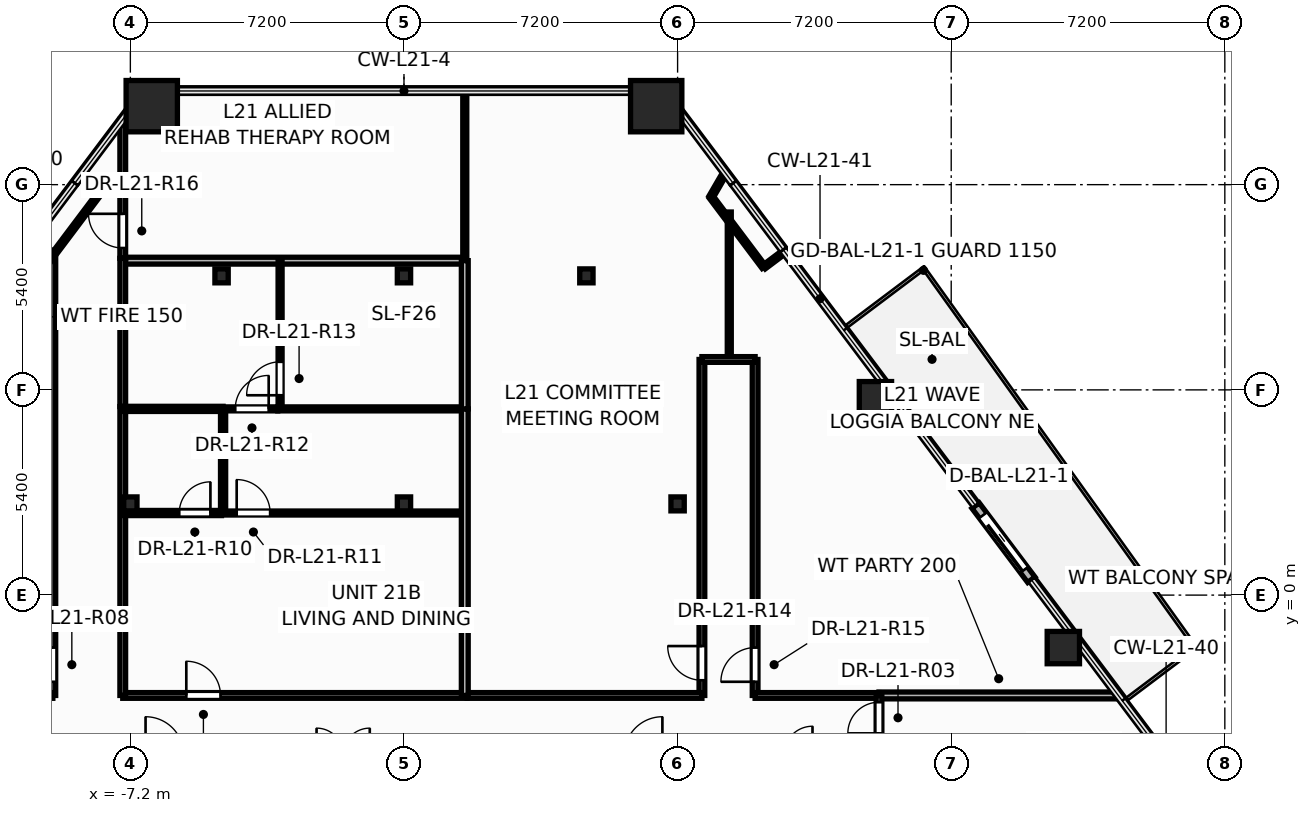
"""IFC4 building model, lengths in metres.
Left out: names, types, materials, properties, quantities, classifications, styles, units other than length and angle.
Written with IfcOpenShell. Run it as: python <this file> out.ifc"""

import sys

from ifc_helpers import new_model, si_unit, direction, frame, frame_2d, origin, origin_2d, place, context, subcontext, project, spatial, rectangle, hollow_rectangle, hollow_circle, i_section, extrude, element, fill, save


model = new_model("IFC4")
c1 = context("Model", 3, precision=1e-05, world=origin(), true_north=direction((0.0, 1.0)))
c2 = subcontext(c1, "Body", "Model", "MODEL_VIEW")
j1 = project(units=[si_unit("LENGTHUNIT", "METRE"), si_unit("PLANEANGLEUNIT", "RADIAN")], contexts=[c1])
p1 = place(None, origin())
s1 = spatial("IfcSite", under=j1, at=p1, CompositionType="ELEMENT")
p2 = place(p1, origin())
s2 = spatial("IfcBuilding", under=s1, at=p2, CompositionType="ELEMENT")
p3 = place(p2, frame((0.0, 0.0, 82.8)))
s3 = spatial("IfcBuildingStorey", under=s2, at=p3, CompositionType="ELEMENT", Elevation=82.8)
for number, where, z_axis, x_axis in (
    (1, (6.637, 12.865, 0.0), (0.0, 0.0, 1.0), (1.0, 0.0, 0.0)),
    (2, (-6.637, 12.865, 0.0), (0.0, 0.0, 1.0), (1.0, 0.0, 0.0)),
):
    element("IfcColumn", number, at=place(p3, frame(where, z_axis=z_axis, x_axis=x_axis)), inside=s3, PredefinedType="COLUMN", context=c2, shape_type="SweptSolid", body=[
        extrude(hollow_rectangle(XDim=1.35, YDim=1.35, WallThickness=0.065, at=origin_2d()), origin(), (0.0, 0.0, 1.0), 3.6),
    ])
for number, where, z_axis, x_axis in (
    (3, (17.351, -1.381, 0.0), (0.0, 0.0, 1.0), (1.0, 0.0, 0.0)),
    (4, (12.406, 5.194, 0.0), (0.0, 0.0, 1.0), (1.0, 0.0, 0.0)),
):
    element("IfcColumn", number, at=place(p3, frame(where, z_axis=z_axis, x_axis=x_axis)), inside=s3, PredefinedType="COLUMN", context=c2, shape_type="SweptSolid", body=[
        extrude(hollow_circle(Radius=0.425, WallThickness=0.038, at=origin_2d()), origin(), (0.0, 0.0, 1.0), 3.6),
    ])
for number, where, z_axis, x_axis in (
    (5, (-7.2, 2.4, 0.0), (0.0, 0.0, 1.0), (1.0, 0.0, 0.0)),
    (6, (0.0, 2.4, 0.0), (0.0, 0.0, 1.0), (1.0, 0.0, 0.0)),
    (7, (7.2, 2.4, 0.0), (0.0, 0.0, 1.0), (1.0, 0.0, 0.0)),
    (8, (-4.8, 8.4, 0.0), (0.0, 0.0, 1.0), (1.0, 0.0, 0.0)),
    (9, (0.0, 8.4, 0.0), (0.0, 0.0, 1.0), (1.0, 0.0, 0.0)),
    (10, (4.8, 8.4, 0.0), (0.0, 0.0, 1.0), (1.0, 0.0, 0.0)),
):
    element("IfcColumn", number, at=place(p3, frame(where, z_axis=z_axis, x_axis=x_axis)), inside=s3, PredefinedType="COLUMN", context=c2, shape_type="SweptSolid", body=[
        extrude(i_section(OverallWidth=0.35, OverallDepth=0.367, WebThickness=0.025, FlangeThickness=0.032, at=origin_2d()), origin(), (0.0, 0.0, 1.0), 3.6),
    ])
p4 = place(p3, frame((16.508, 0.405, -0.015), z_axis=(0.0, 0.0, 1.0), x_axis=(-0.601008208177, 0.799242850268, 0.0)))
e11 = element("IfcWall", 11, at=p4, inside=s3, PredefinedType="STANDARD", context=c2, shape_type="SweptSolid", body=[
    extrude(rectangle(XDim=2.44, YDim=0.24, at=frame_2d((1.22, 0.0))), origin(), (0.0, 0.0, 1.0), 2.729),
])
p5 = place(p4, frame((0.32, 0.0, 0.015)))
e12 = element("IfcOpeningElement", 12, at=p5, cuts=e11, PredefinedType="OPENING", context=c2, shape_type="SweptSolid", body=[
    extrude(rectangle(XDim=1.806, YDim=2.204, at=frame_2d((0.9, 1.102))), frame((0.0, 0.13, 0.0), z_axis=(0.0, -1.0, 0.0), x_axis=(1.0, 0.0, 0.0)), (0.0, 0.0, 1.0), 0.26),
])
p6 = place(p3, frame((-9.24, -2.64, 0.0), z_axis=(0.0, 0.0, 1.0), x_axis=(0.0, 1.0, 0.0)))
e13 = element("IfcWall", 13, at=p6, inside=s3, PredefinedType="PARTITIONING", context=c2, shape_type="SweptSolid", body=[
    extrude(rectangle(XDim=11.72, YDim=0.15, at=frame_2d((5.86, 0.0))), origin(), (0.0, 0.0, 1.0), 2.509),
])
p7 = place(p6, frame((0.359, 0.0, 0.0)))
e14 = element("IfcOpeningElement", 14, at=p7, cuts=e13, PredefinedType="OPENING", context=c2, shape_type="SweptSolid", body=[
    extrude(rectangle(XDim=0.906, YDim=2.104, at=frame_2d((0.45, 1.052))), frame((0.0, 0.085, 0.0), z_axis=(0.0, -1.0, 0.0), x_axis=(1.0, 0.0, 0.0)), (0.0, 0.0, 1.0), 0.17),
])
p8 = place(p3, frame((-7.4, -2.64, 0.0), z_axis=(0.0, 0.0, 1.0), x_axis=(1.0, 0.0, 0.0)))
e15 = element("IfcWall", 15, at=p8, inside=s3, PredefinedType="PARTITIONING", context=c2, shape_type="SweptSolid", body=[
    extrude(rectangle(XDim=9.06, YDim=0.15, at=frame_2d((4.53, 0.0))), origin(), (0.0, 0.0, 1.0), 2.325),
])
p9 = place(p8, frame((1.672, 0.0, 0.0)))
e16 = element("IfcOpeningElement", 16, at=p9, cuts=e15, PredefinedType="OPENING", context=c2, shape_type="SweptSolid", body=[
    extrude(rectangle(XDim=0.906, YDim=2.104, at=frame_2d((0.45, 1.052))), frame((0.0, 0.085, 0.0), z_axis=(0.0, -1.0, 0.0), x_axis=(1.0, 0.0, 0.0)), (0.0, 0.0, 1.0), 0.17),
])
p10 = place(p3, frame((7.84, -2.64, 0.0), z_axis=(0.0, 0.0, 1.0), x_axis=(0.0, 1.0, 0.0)))
e17 = element("IfcWall", 17, at=p10, inside=s3, PredefinedType="PARTITIONING", context=c2, shape_type="SweptSolid", body=[
    extrude(rectangle(XDim=8.84, YDim=0.15, at=frame_2d((4.42, 0.0))), origin(), (0.0, 0.0, 1.0), 2.509),
])
p11 = place(p10, frame((0.399, 0.0, 0.0)))
e18 = element("IfcOpeningElement", 18, at=p11, cuts=e17, PredefinedType="OPENING", context=c2, shape_type="SweptSolid", body=[
    extrude(rectangle(XDim=0.906, YDim=2.104, at=frame_2d((0.45, 1.052))), frame((0.0, 0.085, 0.0), z_axis=(0.0, -1.0, 0.0), x_axis=(1.0, 0.0, 0.0)), (0.0, 0.0, 1.0), 0.17),
])
p12 = place(p3, frame((9.24, -2.64, 0.0), z_axis=(0.0, 0.0, 1.0), x_axis=(0.0, 1.0, 0.0)))
e19 = element("IfcWall", 19, at=p12, inside=s3, PredefinedType="PARTITIONING", context=c2, shape_type="SweptSolid", body=[
    extrude(rectangle(XDim=8.84, YDim=0.15, at=frame_2d((4.42, 0.0))), origin(), (0.0, 0.0, 1.0), 2.509),
])
p13 = place(p12, frame((0.359, 0.0, 0.0)))
e20 = element("IfcOpeningElement", 20, at=p13, cuts=e19, PredefinedType="OPENING", context=c2, shape_type="SweptSolid", body=[
    extrude(rectangle(XDim=0.906, YDim=2.104, at=frame_2d((0.45, 1.052))), frame((0.0, 0.085, 0.0), z_axis=(0.0, -1.0, 0.0), x_axis=(1.0, 0.0, 0.0)), (0.0, 0.0, 1.0), 0.17),
])
p14 = place(p3, frame((-4.8, 2.16, 0.0), z_axis=(0.0, 0.0, 1.0), x_axis=(1.0, 0.0, 0.0)))
e21 = element("IfcWall", 21, at=p14, inside=s3, PredefinedType="PARTITIONING", context=c2, shape_type="SweptSolid", body=[
    extrude(rectangle(XDim=6.4, YDim=0.105, at=frame_2d((3.2, 0.0))), origin(), (0.0, 0.0, 1.0), 2.325),
])
p15 = place(p14, frame((0.398, 0.0, 0.0)))
e22 = element("IfcOpeningElement", 22, at=p15, cuts=e21, PredefinedType="OPENING", context=c2, shape_type="SweptSolid", body=[
    extrude(rectangle(XDim=0.886, YDim=2.104, at=frame_2d((0.44, 1.052))), frame((0.0, 0.062, 0.0), z_axis=(0.0, -1.0, 0.0), x_axis=(1.0, 0.0, 0.0)), (0.0, 0.0, 1.0), 0.125),
])
p16 = place(p3, frame((1.662, -2.64, 0.0), z_axis=(0.0, 0.0, 1.0), x_axis=(1.0, 0.0, 0.0)))
e23 = element("IfcWall", 23, at=p16, inside=s3, PredefinedType="PARTITIONING", context=c2, shape_type="SweptSolid", body=[
    extrude(rectangle(XDim=6.178, YDim=0.15, at=frame_2d((3.089, 0.0))), origin(), (0.0, 0.0, 1.0), 2.325),
])
p17 = place(p3, frame((12.5, -2.64, 0.0), z_axis=(0.0, 0.0, 1.0), x_axis=(1.0, 0.0, 0.0)))
e24 = element("IfcWall", 24, at=p17, inside=s3, PredefinedType="PARTITIONING", context=c2, shape_type="SweptSolid", body=[
    extrude(rectangle(XDim=6.298, YDim=0.18, at=frame_2d((3.149, 0.0))), origin(), (0.0, 0.0, 1.0), 2.713),
])
p18 = place(p3, frame((-14.64, -2.64, 0.0), z_axis=(0.0, 0.0, 1.0), x_axis=(1.0, 0.0, 0.0)))
e25 = element("IfcWall", 25, at=p18, inside=s3, PredefinedType="PARTITIONING", context=c2, shape_type="SweptSolid", body=[
    extrude(rectangle(XDim=5.4, YDim=0.15, at=frame_2d((2.7, 0.0))), origin(), (0.0, 0.0, 1.0), 3.35),
])
p19 = place(p3, frame((-3.32, 4.9, 0.0), z_axis=(0.0, 0.0, 1.0), x_axis=(1.0, 0.0, 0.0)))
e26 = element("IfcWall", 26, at=p19, inside=s3, PredefinedType="PARTITIONING", context=c2, shape_type="SweptSolid", body=[
    extrude(rectangle(XDim=4.92, YDim=0.105, at=frame_2d((2.46, 0.0))), origin(), (0.0, 0.0, 1.0), 2.325),
])
p20 = place(p3, frame((-7.4, 8.8, 0.0), z_axis=(0.0, 0.0, 1.0), x_axis=(1.0, 0.0, 0.0)))
e27 = element("IfcWall", 27, at=p20, inside=s3, PredefinedType="PARTITIONING", context=c2, shape_type="SweptSolid", body=[
    extrude(rectangle(XDim=9.0, YDim=0.18, at=frame_2d((4.5, 0.0))), origin(), (0.0, 0.0, 1.0), 2.509),
])
p21 = place(p3, frame((-7.4, -2.64, 0.0), z_axis=(0.0, 0.0, 1.0), x_axis=(0.0, 1.0, 0.0)))
e28 = element("IfcWall", 28, at=p21, inside=s3, PredefinedType="PARTITIONING", context=c2, shape_type="SweptSolid", body=[
    extrude(rectangle(XDim=7.6, YDim=0.15, at=frame_2d((3.8, 0.0))), origin(), (0.0, 0.0, 1.0), 2.325),
])
p22 = place(p3, frame((1.6, -2.64, 0.0), z_axis=(0.0, 0.0, 1.0), x_axis=(0.0, 1.0, 0.0)))
e29 = element("IfcWall", 29, at=p22, inside=s3, PredefinedType="PARTITIONING", context=c2, shape_type="SweptSolid", body=[
    extrude(rectangle(XDim=7.54, YDim=0.18, at=frame_2d((3.77, 0.0))), origin(), (0.0, 0.0, 1.0), 2.325),
])
p23 = place(p3, frame((1.6, 8.74, 0.0), z_axis=(0.0, 0.0, 1.0), x_axis=(0.0, 1.0, 0.0)))
e30 = element("IfcWall", 30, at=p23, inside=s3, PredefinedType="PARTITIONING", context=c2, shape_type="SweptSolid", body=[
    extrude(rectangle(XDim=4.525, YDim=0.105, at=frame_2d((2.263, 0.0))), origin(), (0.0, 0.0, 1.0), 2.713),
])
p24 = place(p3, frame((-7.4, 4.962, 0.0), z_axis=(0.0, 0.0, 1.0), x_axis=(0.0, 1.0, 0.0)))
e31 = element("IfcWall", 31, at=p24, inside=s3, PredefinedType="PARTITIONING", context=c2, shape_type="SweptSolid", body=[
    extrude(rectangle(XDim=3.898, YDim=0.15, at=frame_2d((1.949, 0.0))), origin(), (0.0, 0.0, 1.0), 2.509),
])
p25 = place(p3, frame((-3.26, 4.9, 0.0), z_axis=(0.0, 0.0, 1.0), x_axis=(0.0, 1.0, 0.0)))
e32 = element("IfcWall", 32, at=p25, inside=s3, PredefinedType="PARTITIONING", context=c2, shape_type="SweptSolid", body=[
    extrude(rectangle(XDim=3.9, YDim=0.105, at=frame_2d((1.95, 0.0))), origin(), (0.0, 0.0, 1.0), 2.509),
])
p26 = place(p25, frame((0.358, 0.0, 0.0)))
e33 = element("IfcOpeningElement", 33, at=p26, cuts=e32, PredefinedType="OPENING", context=c2, shape_type="SweptSolid", body=[
    extrude(rectangle(XDim=0.886, YDim=2.104, at=frame_2d((0.44, 1.052))), frame((0.0, 0.062, 0.0), z_axis=(0.0, -1.0, 0.0), x_axis=(1.0, 0.0, 0.0)), (0.0, 0.0, 1.0), 0.125),
])
p27 = place(p3, frame((1.6, 4.9, 0.0), z_axis=(0.0, 0.0, 1.0), x_axis=(0.0, 1.0, 0.0)))
e34 = element("IfcWall", 34, at=p27, inside=s3, PredefinedType="PARTITIONING", context=c2, shape_type="SweptSolid", body=[
    extrude(rectangle(XDim=3.9, YDim=0.18, at=frame_2d((1.95, 0.0))), origin(), (0.0, 0.0, 1.0), 2.509),
])
p28 = place(p3, frame((8.56, 6.2, 0.0), z_axis=(0.0, 0.0, 1.0), x_axis=(0.0, 1.0, 0.0)))
e35 = element("IfcWall", 35, at=p28, inside=s3, PredefinedType="PARTITIONING", context=c2, shape_type="SweptSolid", body=[
    extrude(rectangle(XDim=3.88, YDim=0.105, at=frame_2d((1.94, 0.0))), origin(), (0.0, 0.0, 1.0), 2.509),
])
p29 = place(p3, frame((-7.4, 8.862, 0.0), z_axis=(0.0, 0.0, 1.0), x_axis=(0.0, 1.0, 0.0)))
e36 = element("IfcWall", 36, at=p29, inside=s3, PredefinedType="PARTITIONING", context=c2, shape_type="SweptSolid", body=[
    extrude(rectangle(XDim=3.654, YDim=0.15, at=frame_2d((1.827, 0.0))), origin(), (0.0, 0.0, 1.0), 2.713),
])
p30 = place(p29, frame((0.271, 0.0, 0.0)))
e37 = element("IfcOpeningElement", 37, at=p30, cuts=e36, PredefinedType="OPENING", context=c2, shape_type="SweptSolid", body=[
    extrude(rectangle(XDim=0.906, YDim=2.104, at=frame_2d((0.45, 1.052))), frame((0.0, 0.085, 0.0), z_axis=(0.0, -1.0, 0.0), x_axis=(1.0, 0.0, 0.0)), (0.0, 0.0, 1.0), 0.17),
])
p31 = place(p3, frame((9.24, -2.64, 0.0), z_axis=(0.0, 0.0, 1.0), x_axis=(1.0, 0.0, 0.0)))
e38 = element("IfcWall", 38, at=p31, inside=s3, PredefinedType="PARTITIONING", context=c2, shape_type="SweptSolid", body=[
    extrude(rectangle(XDim=3.26, YDim=0.15, at=frame_2d((1.63, 0.0))), origin(), (0.0, 0.0, 1.0), 3.35),
])
p32 = place(p3, frame((-4.76, 2.16, 0.0), z_axis=(0.0, 0.0, 1.0), x_axis=(0.0, 1.0, 0.0)))
e39 = element("IfcWall", 39, at=p32, inside=s3, PredefinedType="PARTITIONING", context=c2, shape_type="SweptSolid", body=[
    extrude(rectangle(XDim=2.74, YDim=0.135, at=frame_2d((1.37, 0.0))), origin(), (0.0, 0.0, 1.0), 2.325),
])
p33 = place(p3, frame((-7.4, 2.16, 0.0), z_axis=(0.0, 0.0, 1.0), x_axis=(1.0, 0.0, 0.0)))
e40 = element("IfcWall", 40, at=p33, inside=s3, PredefinedType="PARTITIONING", context=c2, shape_type="SweptSolid", body=[
    extrude(rectangle(XDim=2.598, YDim=0.135, at=frame_2d((1.299, 0.0))), origin(), (0.0, 0.0, 1.0), 2.325),
])
p34 = place(p33, frame((1.487, 0.0, 0.0)))
e41 = element("IfcOpeningElement", 41, at=p34, cuts=e40, PredefinedType="OPENING", context=c2, shape_type="SweptSolid", body=[
    extrude(rectangle(XDim=0.826, YDim=2.104, at=frame_2d((0.41, 1.052))), frame((0.0, 0.078, 0.0), z_axis=(0.0, -1.0, 0.0), x_axis=(1.0, 0.0, 0.0)), (0.0, 0.0, 1.0), 0.155),
])
p35 = place(p3, frame((-7.4, 4.9, 0.0), z_axis=(0.0, 0.0, 1.0), x_axis=(1.0, 0.0, 0.0)))
e42 = element("IfcWall", 42, at=p35, inside=s3, PredefinedType="PARTITIONING", context=c2, shape_type="SweptSolid", body=[
    extrude(rectangle(XDim=2.64, YDim=0.135, at=frame_2d((1.32, 0.0))), origin(), (0.0, 0.0, 1.0), 2.509),
])
for number, where, z_axis, x_axis in (
    (43, (-8.082, 10.478, 0.0), (0.0, 0.0, 1.0), (-0.601, -0.799, 0.0)),
    (44, (9.471, 8.631, 0.0), (0.0, 0.0, 1.0), (-0.601, 0.799, 0.0)),
):
    element("IfcWall", number, at=place(p3, frame(where, z_axis=z_axis, x_axis=x_axis)), inside=s3, PredefinedType="PARTITIONING", context=c2, shape_type="SweptSolid", body=[
        extrude(rectangle(XDim=2.311, YDim=0.12, at=frame_2d((1.156, 0.0))), origin(), (0.0, 0.0, 1.0), 3.35),
    ])
p36 = place(p3, frame((12.5, -4.24, 0.0), z_axis=(0.0, 0.0, 1.0), x_axis=(0.0, 1.0, 0.0)))
e45 = element("IfcWall", 45, at=p36, inside=s3, PredefinedType="PARTITIONING", context=c2, shape_type="SweptSolid", body=[
    extrude(rectangle(XDim=1.6, YDim=0.15, at=frame_2d((0.8, 0.0))), origin(), (0.0, 0.0, 1.0), 2.325),
])
p37 = place(p36, frame((0.602, 0.0, 0.0)))
e46 = element("IfcOpeningElement", 46, at=p37, cuts=e45, PredefinedType="OPENING", context=c2, shape_type="SweptSolid", body=[
    extrude(rectangle(XDim=0.826, YDim=2.104, at=frame_2d((0.41, 1.052))), frame((0.0, 0.085, 0.0), z_axis=(0.0, -1.0, 0.0), x_axis=(1.0, 0.0, 0.0)), (0.0, 0.0, 1.0), 0.17),
])
p38 = place(p3, frame((-4.76, 4.9, 0.0), z_axis=(0.0, 0.0, 1.0), x_axis=(1.0, 0.0, 0.0)))
e47 = element("IfcWall", 47, at=p38, inside=s3, PredefinedType="PARTITIONING", context=c2, shape_type="SweptSolid", body=[
    extrude(rectangle(XDim=1.438, YDim=0.105, at=frame_2d((0.719, 0.0))), origin(), (0.0, 0.0, 1.0), 3.35),
])
p39 = place(p38, frame((0.32, 0.0, 0.0)))
e48 = element("IfcOpeningElement", 48, at=p39, cuts=e47, PredefinedType="OPENING", context=c2, shape_type="SweptSolid", body=[
    extrude(rectangle(XDim=0.886, YDim=2.104, at=frame_2d((0.44, 1.052))), frame((0.0, 0.062, 0.0), z_axis=(0.0, -1.0, 0.0), x_axis=(1.0, 0.0, 0.0)), (0.0, 0.0, 1.0), 0.125),
])
p40 = place(p3, frame((7.84, 6.2, 0.0), z_axis=(0.0, 0.0, 1.0), x_axis=(1.0, 0.0, 0.0)))
e49 = element("IfcWall", 49, at=p40, inside=s3, PredefinedType="PARTITIONING", context=c2, shape_type="SweptSolid", body=[
    extrude(rectangle(XDim=1.4, YDim=0.15, at=frame_2d((0.7, 0.0))), origin(), (0.0, 0.0, 1.0), 3.35),
])
for number, where, z_axis, x_axis in (
    (50, (-8.447, 11.108, 0.0), (0.0, 0.0, 1.0), (0.502, -0.865, 0.0)),
    (51, (8.082, 10.478, 0.0), (0.0, 0.0, 1.0), (0.502, 0.865, 0.0)),
):
    element("IfcWall", number, at=place(p3, frame(where, z_axis=z_axis, x_axis=x_axis)), inside=s3, PredefinedType="PARTITIONING", context=c2, shape_type="SweptSolid", body=[
        extrude(rectangle(XDim=0.728, YDim=0.12, at=frame_2d((0.364, 0.0))), origin(), (0.0, 0.0, 1.0), 2.713),
    ])
p41 = place(p3, frame((10.006, 9.034, 0.0), z_axis=(0.0, 0.0, 1.0), x_axis=(-0.799387472953, -0.600815835415, 0.0)))
e52 = element("IfcWall", 52, at=p41, inside=s3, PredefinedType="PARTITIONING", context=c2, shape_type="SweptSolid", body=[
    extrude(rectangle(XDim=0.67, YDim=0.12, at=frame_2d((0.335, 0.0))), origin(), (0.0, 0.0, 1.0), 2.713),
])
p42 = place(p5, origin())
e53 = element("IfcDoor", 53, at=p42, inside=s3, OperationType="SLIDING_TO_LEFT", PredefinedType="DOOR", context=c2, shape_type="SweptSolid", body=[
    extrude(rectangle(XDim=1.8, YDim=2.2, at=frame_2d((0.9, 1.1))), frame((0.0, 0.025, 0.0), z_axis=(0.0, -1.0, 0.0), x_axis=(1.0, 0.0, 0.0)), (0.0, 0.0, 1.0), 0.05),
])
fill(e12, e53)
p43 = place(p37, origin())
e54 = element("IfcDoor", 54, at=p43, inside=s3, OperationType="SINGLE_SWING_LEFT", PredefinedType="DOOR", context=c2, shape_type="SweptSolid", body=[
    extrude(rectangle(XDim=0.82, YDim=2.1, at=frame_2d((0.41, 1.05))), frame((0.0, 0.025, 0.0), z_axis=(0.0, -1.0, 0.0), x_axis=(1.0, 0.0, 0.0)), (0.0, 0.0, 1.0), 0.05),
])
fill(e46, e54)
p44 = place(p7, origin())
e55 = element("IfcDoor", 55, at=p44, inside=s3, OperationType="SINGLE_SWING_RIGHT", PredefinedType="DOOR", context=c2, shape_type="SweptSolid", body=[
    extrude(rectangle(XDim=0.9, YDim=2.1, at=frame_2d((0.45, 1.05))), frame((0.0, 0.025, 0.0), z_axis=(0.0, -1.0, 0.0), x_axis=(1.0, 0.0, 0.0)), (0.0, 0.0, 1.0), 0.05),
])
fill(e14, e55)
p45 = place(p9, origin())
e56 = element("IfcDoor", 56, at=p45, inside=s3, OperationType="SINGLE_SWING_LEFT", PredefinedType="DOOR", context=c2, shape_type="SweptSolid", body=[
    extrude(rectangle(XDim=0.9, YDim=2.1, at=frame_2d((0.45, 1.05))), frame((0.0, 0.025, 0.0), z_axis=(0.0, -1.0, 0.0), x_axis=(1.0, 0.0, 0.0)), (0.0, 0.0, 1.0), 0.05),
])
fill(e16, e56)
p46 = place(p34, origin())
e57 = element("IfcDoor", 57, at=p46, inside=s3, OperationType="SINGLE_SWING_RIGHT", PredefinedType="DOOR", context=c2, shape_type="SweptSolid", body=[
    extrude(rectangle(XDim=0.82, YDim=2.1, at=frame_2d((0.41, 1.05))), frame((0.0, 0.025, 0.0), z_axis=(0.0, -1.0, 0.0), x_axis=(1.0, 0.0, 0.0)), (0.0, 0.0, 1.0), 0.05),
])
fill(e41, e57)
p47 = place(p15, origin())
e58 = element("IfcDoor", 58, at=p47, inside=s3, OperationType="SINGLE_SWING_LEFT", PredefinedType="DOOR", context=c2, shape_type="SweptSolid", body=[
    extrude(rectangle(XDim=0.88, YDim=2.1, at=frame_2d((0.44, 1.05))), frame((0.0, 0.025, 0.0), z_axis=(0.0, -1.0, 0.0), x_axis=(1.0, 0.0, 0.0)), (0.0, 0.0, 1.0), 0.05),
])
fill(e22, e58)
p48 = place(p39, origin())
e59 = element("IfcDoor", 59, at=p48, inside=s3, OperationType="SINGLE_SWING_RIGHT", PredefinedType="DOOR", context=c2, shape_type="SweptSolid", body=[
    extrude(rectangle(XDim=0.88, YDim=2.1, at=frame_2d((0.44, 1.05))), frame((0.0, 0.025, 0.0), z_axis=(0.0, -1.0, 0.0), x_axis=(1.0, 0.0, 0.0)), (0.0, 0.0, 1.0), 0.05),
])
fill(e48, e59)
p49 = place(p26, origin())
e60 = element("IfcDoor", 60, at=p49, inside=s3, OperationType="SINGLE_SWING_LEFT", PredefinedType="DOOR", context=c2, shape_type="SweptSolid", body=[
    extrude(rectangle(XDim=0.88, YDim=2.1, at=frame_2d((0.44, 1.05))), frame((0.0, 0.025, 0.0), z_axis=(0.0, -1.0, 0.0), x_axis=(1.0, 0.0, 0.0)), (0.0, 0.0, 1.0), 0.05),
])
fill(e33, e60)
p50 = place(p11, origin())
e61 = element("IfcDoor", 61, at=p50, inside=s3, OperationType="SINGLE_SWING_RIGHT", PredefinedType="DOOR", context=c2, shape_type="SweptSolid", body=[
    extrude(rectangle(XDim=0.9, YDim=2.1, at=frame_2d((0.45, 1.05))), frame((0.0, 0.025, 0.0), z_axis=(0.0, -1.0, 0.0), x_axis=(1.0, 0.0, 0.0)), (0.0, 0.0, 1.0), 0.05),
])
fill(e18, e61)
p51 = place(p13, origin())
e62 = element("IfcDoor", 62, at=p51, inside=s3, OperationType="SINGLE_SWING_LEFT", PredefinedType="DOOR", context=c2, shape_type="SweptSolid", body=[
    extrude(rectangle(XDim=0.9, YDim=2.1, at=frame_2d((0.45, 1.05))), frame((0.0, 0.025, 0.0), z_axis=(0.0, -1.0, 0.0), x_axis=(1.0, 0.0, 0.0)), (0.0, 0.0, 1.0), 0.05),
])
fill(e20, e62)
p52 = place(p30, origin())
e63 = element("IfcDoor", 63, at=p52, inside=s3, OperationType="SINGLE_SWING_RIGHT", PredefinedType="DOOR", context=c2, shape_type="SweptSolid", body=[
    extrude(rectangle(XDim=0.9, YDim=2.1, at=frame_2d((0.45, 1.05))), frame((0.0, 0.025, 0.0), z_axis=(0.0, -1.0, 0.0), x_axis=(1.0, 0.0, 0.0)), (0.0, 0.0, 1.0), 0.05),
])
fill(e37, e63)
save(model, sys.argv[1])
